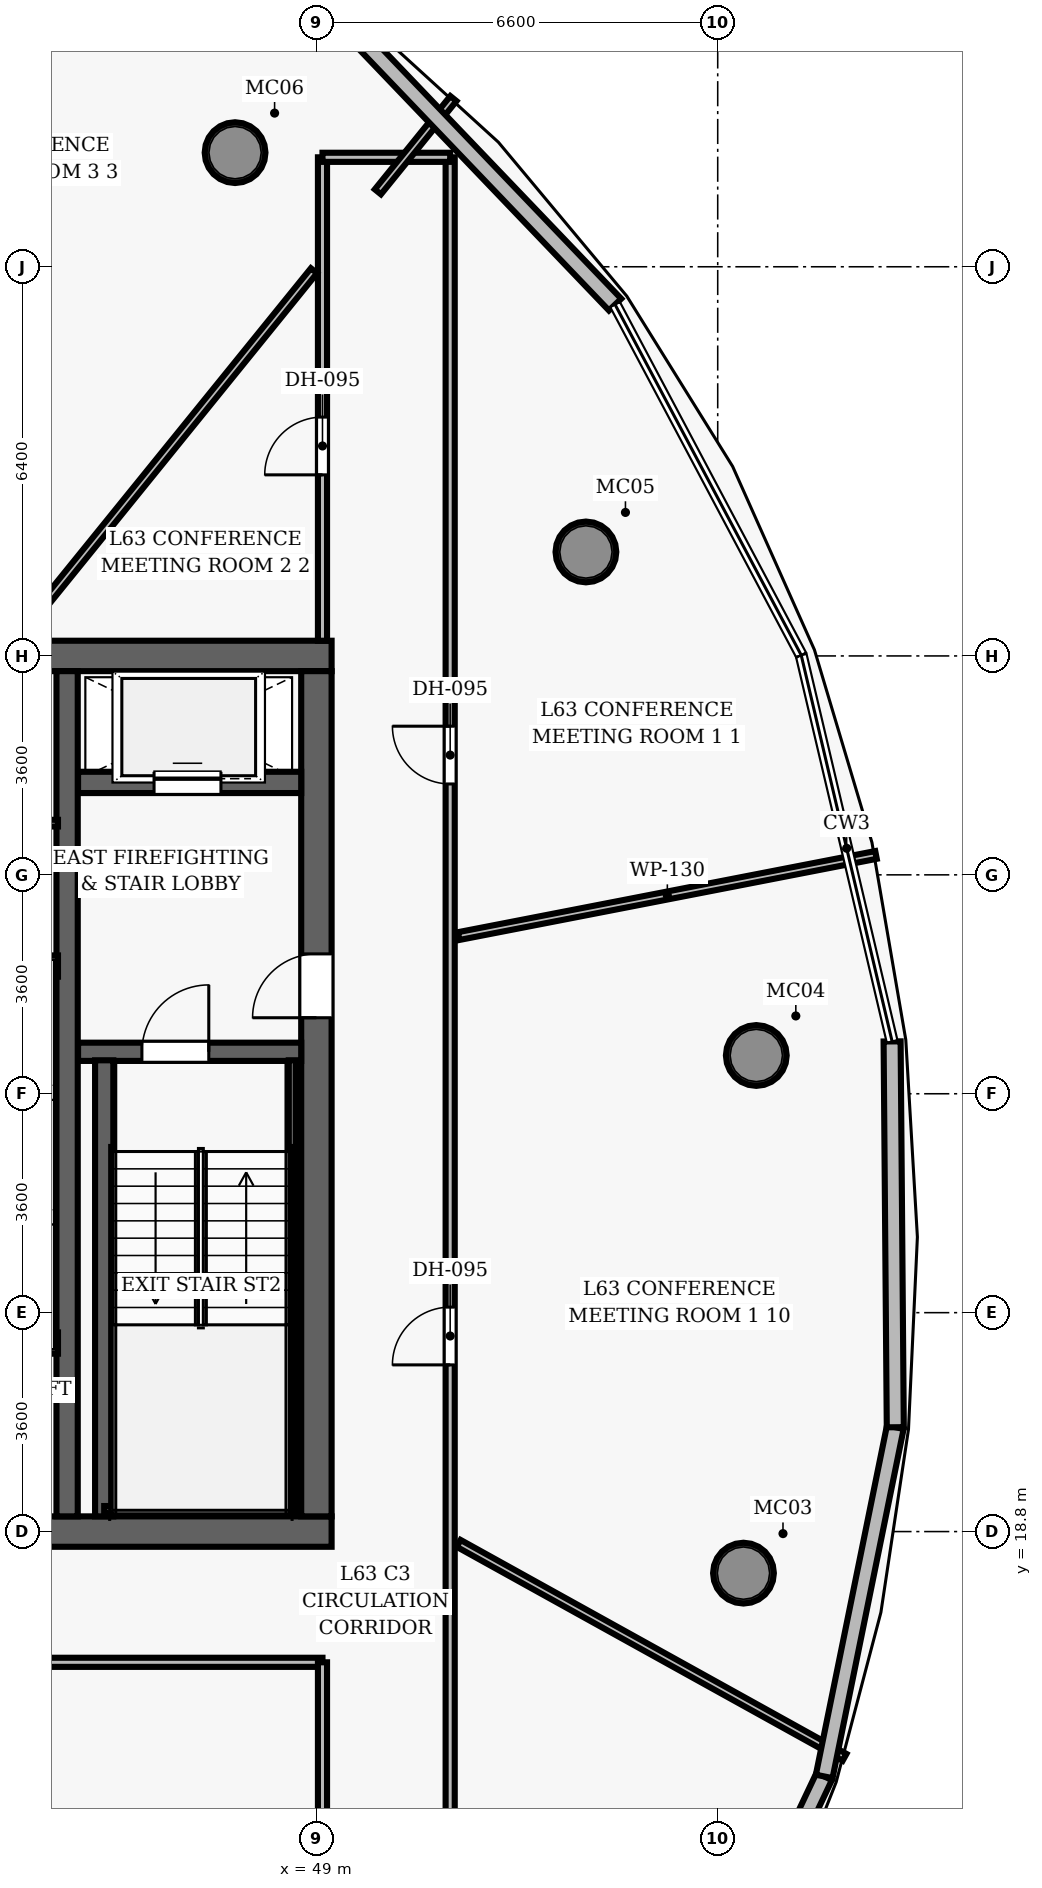
"""IFC4 building model, lengths in metres.
Left out: names, types, materials, properties, quantities, classifications, styles, units other than length and angle.
Written with IfcOpenShell. Run it as: python <this file> out.ifc"""

import sys

from ifc_helpers import new_model, si_unit, direction, frame, frame_2d, origin, origin_2d, place, context, subcontext, project, spatial, rectangle, hollow_circle, extrude, element, fill, save


model = new_model("IFC4")
c1 = context("Model", 3, precision=1e-05, world=origin(), true_north=direction((0.0, 1.0)))
c2 = subcontext(c1, "Body", "Model", "MODEL_VIEW")
j1 = project(units=[si_unit("LENGTHUNIT", "METRE"), si_unit("PLANEANGLEUNIT", "RADIAN")], contexts=[c1])
p1 = place(None, origin())
s1 = spatial("IfcSite", under=j1, at=p1, CompositionType="ELEMENT")
p2 = place(p1, origin())
s2 = spatial("IfcBuilding", under=s1, at=p2, CompositionType="ELEMENT")
p3 = place(p2, frame((0.0, 0.0, 249.75)))
s3 = spatial("IfcBuildingStorey", under=s2, at=p3, CompositionType="ELEMENT", Elevation=249.75)
p4 = place(p3, frame((26.75, 18.8, 0.0), z_axis=(0.0, 0.0, 1.0), x_axis=(1.0, 0.0, 0.0)))
e1 = element("IfcWall", 1, at=p4, inside=s3, PredefinedType="SHEAR", context=c2, shape_type="SweptSolid", body=[
    extrude(rectangle(XDim=22.5, YDim=0.5, at=frame_2d((11.25, 0.0))), origin(), (0.0, 0.0, 1.0), 3.85),
])
p5 = place(p4, frame((14.47, 0.0, 0.0)))
e2 = element("IfcOpeningElement", 2, at=p5, cuts=e1, PredefinedType="OPENING", context=c2, shape_type="SweptSolid", body=[
    extrude(rectangle(XDim=1.05, YDim=2.15, at=frame_2d((0.525, 1.075))), frame((0.0, 0.26, 0.0), z_axis=(0.0, -1.0, 0.0), x_axis=(1.0, 0.0, 0.0)), (0.0, 0.0, 1.0), 0.52),
])
p6 = place(p3, frame((26.75, 33.2, 0.0), z_axis=(0.0, 0.0, 1.0), x_axis=(1.0, 0.0, 0.0)))
e3 = element("IfcWall", 3, at=p6, inside=s3, PredefinedType="SHEAR", context=c2, shape_type="SweptSolid", body=[
    extrude(rectangle(XDim=22.5, YDim=0.5, at=frame_2d((11.25, 0.0))), origin(), (0.0, 0.0, 1.0), 3.85),
])
p7 = place(p3, frame((49.0, 19.05, 0.0), z_axis=(0.0, 0.0, 1.0), x_axis=(0.0, 1.0, 0.0)))
e4 = element("IfcWall", 4, at=p7, inside=s3, PredefinedType="SHEAR", context=c2, shape_type="SweptSolid", body=[
    extrude(rectangle(XDim=13.9, YDim=0.5, at=frame_2d((6.95, 0.0))), origin(), (0.0, 0.0, 1.0), 3.85),
])
p8 = place(p7, frame((8.2, 0.0, 0.0)))
e5 = element("IfcOpeningElement", 5, at=p8, cuts=e4, PredefinedType="OPENING", context=c2, shape_type="SweptSolid", body=[
    extrude(rectangle(XDim=1.05, YDim=2.15, at=frame_2d((0.525, 1.075))), frame((0.0, 0.26, 0.0), z_axis=(0.0, -1.0, 0.0), x_axis=(1.0, 0.0, 0.0)), (0.0, 0.0, 1.0), 0.52),
])
p9 = place(p3, frame((44.9, 19.05, 0.0), z_axis=(0.0, 0.0, 1.0), x_axis=(0.0, 1.0, 0.0)))
e6 = element("IfcWall", 6, at=p9, inside=s3, PredefinedType="SHEAR", context=c2, shape_type="SweptSolid", body=[
    extrude(rectangle(XDim=13.9, YDim=0.35, at=frame_2d((6.95, 0.0))), origin(), (0.0, 0.0, 1.0), 3.85),
])
for number, where, z_axis, x_axis in (
    (7, (56.024, 18.116, 0.0), (0.0, 0.0, 1.0), (1.0, 0.0, 0.0)),
    (8, (56.235, 26.629, 0.0), (0.0, 0.0, 1.0), (1.0, 0.0, 0.0)),
    (9, (53.433, 34.91, 0.0), (0.0, 0.0, 1.0), (1.0, 0.0, 0.0)),
    (10, (47.662, 41.477, 0.0), (0.0, 0.0, 1.0), (1.0, 0.0, 0.0)),
):
    element("IfcColumn", number, at=place(p3, frame(where, z_axis=z_axis, x_axis=x_axis)), inside=s3, PredefinedType="COLUMN", context=c2, shape_type="SweptSolid", body=[
        extrude(hollow_circle(Radius=0.5, WallThickness=0.045, at=origin_2d()), origin(), (0.0, 0.0, 1.0), 3.85),
    ])
p10 = place(p3, frame((45.08, 26.69, 0.0), z_axis=(0.0, 0.0, 1.0), x_axis=(1.0, 0.0, 0.0)))
e11 = element("IfcWall", 11, at=p10, inside=s3, PredefinedType="SHEAR", context=c2, shape_type="SweptSolid", body=[
    extrude(rectangle(XDim=3.67, YDim=0.3, at=frame_2d((1.835, 0.0))), origin(), (0.0, 0.0, 1.0), 3.85),
])
p11 = place(p10, frame((1.05, 0.0, 0.0)))
e12 = element("IfcOpeningElement", 12, at=p11, cuts=e11, PredefinedType="OPENING", context=c2, shape_type="SweptSolid", body=[
    extrude(rectangle(XDim=1.1, YDim=2.15, at=frame_2d((0.55, 1.075))), frame((0.0, 0.16, 0.0), z_axis=(0.0, -1.0, 0.0), x_axis=(1.0, 0.0, 0.0)), (0.0, 0.0, 1.0), 0.32),
])
p12 = place(p3, frame((45.51, 19.05, 0.0), z_axis=(0.0, 0.0, 1.0), x_axis=(0.0, 1.0, 0.0)))
e13 = element("IfcWall", 13, at=p12, inside=s3, PredefinedType="SHEAR", context=c2, shape_type="SweptSolid", body=[
    extrude(rectangle(XDim=7.5, YDim=0.3, at=frame_2d((3.75, 0.0))), origin(), (0.0, 0.0, 1.0), 3.85),
])
p13 = place(p3, frame((48.605, 19.1, 0.0), z_axis=(0.0, 0.0, 1.0), x_axis=(0.0, 1.0, 0.0)))
e14 = element("IfcWall", 14, at=p13, inside=s3, PredefinedType="SHEAR", context=c2, shape_type="SweptSolid", body=[
    extrude(rectangle(XDim=7.45, YDim=0.12, at=frame_2d((3.725, 0.0))), origin(), (0.0, 0.0, 1.0), 3.85),
])
p14 = place(p3, frame((45.51, 19.16, 0.0), z_axis=(0.0, 0.0, 1.0), x_axis=(1.0, 0.0, 0.0)))
e15 = element("IfcWall", 15, at=p14, inside=s3, PredefinedType="SHEAR", context=c2, shape_type="SweptSolid", body=[
    extrude(rectangle(XDim=3.095, YDim=0.12, at=frame_2d((1.547, 0.0))), origin(), (0.0, 0.0, 1.0), 3.85),
])
p15 = place(p3, frame((45.08, 31.12, 0.0), z_axis=(0.0, 0.0, 1.0), x_axis=(1.0, 0.0, 0.0)))
e16 = element("IfcWall", 16, at=p15, inside=s3, PredefinedType="SHEAR", context=c2, shape_type="SweptSolid", body=[
    extrude(rectangle(XDim=3.67, YDim=0.35, at=frame_2d((1.835, 0.0))), origin(), (0.0, 0.0, 1.0), 3.04),
])
p16 = place(p15, frame((1.25, 0.0, 0.0)))
e17 = element("IfcOpeningElement", 17, at=p16, cuts=e16, PredefinedType="OPENING", context=c2, shape_type="SweptSolid", body=[
    extrude(rectangle(XDim=1.1, YDim=2.15, at=frame_2d((0.55, 1.075))), frame((0.0, 0.185, 0.0), z_axis=(0.0, -1.0, 0.0), x_axis=(1.0, 0.0, 0.0)), (0.0, 0.0, 1.0), 0.37),
])
for number, where, z_axis, x_axis in (
    (18, (42.72, 21.9, 0.0), (0.0, 0.0, 1.0), (1.0, 0.0, 0.0)),
    (19, (42.72, 28.1, 0.0), (0.0, 0.0, 1.0), (1.0, 0.0, 0.0)),
):
    element("IfcWall", number, at=place(p3, frame(where, z_axis=z_axis, x_axis=x_axis)), inside=s3, PredefinedType="SHEAR", context=c2, shape_type="SweptSolid", body=[
        extrude(rectangle(XDim=2.03, YDim=0.35, at=frame_2d((1.015, 0.0))), origin(), (0.0, 0.0, 1.0), 3.04),
    ])
p17 = place(p3, frame((42.55, 30.45, 0.0), z_axis=(0.0, 0.0, 1.0), x_axis=(1.0, 0.0, 0.0)))
e20 = element("IfcWall", 20, at=p17, inside=s3, PredefinedType="PARTITIONING", context=c2, shape_type="SweptSolid", body=[
    extrude(rectangle(XDim=2.2, YDim=0.11, at=frame_2d((1.1, 0.0))), origin(), (0.0, 0.0, 1.0), 3.04),
])
p18 = place(p3, frame((26.9, 16.65, 0.0), z_axis=(0.0, 0.0, 1.0), x_axis=(1.0, 0.0, 0.0)))
e21 = element("IfcWall", 21, at=p18, inside=s3, PredefinedType="PARTITIONING", context=c2, shape_type="SweptSolid", body=[
    extrude(rectangle(XDim=22.2, YDim=0.15, at=frame_2d((11.1, 0.0))), origin(), (0.0, 0.0, 1.0), 3.04),
])
p19 = place(p18, frame((5.627, 0.0, 0.0)))
e22 = element("IfcOpeningElement", 22, at=p19, cuts=e21, PredefinedType="OPENING", context=c2, shape_type="SweptSolid", body=[
    extrude(rectangle(XDim=0.95, YDim=2.15, at=frame_2d((0.475, 1.075))), frame((0.0, 0.085, 0.0), z_axis=(0.0, -1.0, 0.0), x_axis=(1.0, 0.0, 0.0)), (0.0, 0.0, 1.0), 0.17),
])
p20 = place(p18, frame((12.684, 0.0, 0.0)))
e23 = element("IfcOpeningElement", 23, at=p20, cuts=e21, PredefinedType="OPENING", context=c2, shape_type="SweptSolid", body=[
    extrude(rectangle(XDim=0.95, YDim=2.15, at=frame_2d((0.475, 1.075))), frame((0.0, 0.085, 0.0), z_axis=(0.0, -1.0, 0.0), x_axis=(1.0, 0.0, 0.0)), (0.0, 0.0, 1.0), 0.17),
])
p21 = place(p18, frame((15.904, 0.0, 0.0)))
e24 = element("IfcOpeningElement", 24, at=p21, cuts=e21, PredefinedType="OPENING", context=c2, shape_type="SweptSolid", body=[
    extrude(rectangle(XDim=0.95, YDim=2.15, at=frame_2d((0.475, 1.075))), frame((0.0, 0.085, 0.0), z_axis=(0.0, -1.0, 0.0), x_axis=(1.0, 0.0, 0.0)), (0.0, 0.0, 1.0), 0.17),
])
p22 = place(p3, frame((51.2, 10.6, 0.0), z_axis=(0.0, 0.0, 1.0), x_axis=(0.0, 1.0, 0.0)))
e25 = element("IfcWall", 25, at=p22, inside=s3, PredefinedType="PARTITIONING", context=c2, shape_type="SweptSolid", body=[
    extrude(rectangle(XDim=30.8, YDim=0.15, at=frame_2d((15.4, 0.0))), origin(), (0.0, 0.0, 1.0), 3.04),
])
p23 = place(p22, frame((20.494, 0.0, 0.0)))
e26 = element("IfcOpeningElement", 26, at=p23, cuts=e25, PredefinedType="OPENING", context=c2, shape_type="SweptSolid", body=[
    extrude(rectangle(XDim=0.95, YDim=2.15, at=frame_2d((0.475, 1.075))), frame((0.0, 0.085, 0.0), z_axis=(0.0, -1.0, 0.0), x_axis=(1.0, 0.0, 0.0)), (0.0, 0.0, 1.0), 0.17),
])
p24 = place(p22, frame((10.941, 0.0, 0.0)))
e27 = element("IfcOpeningElement", 27, at=p24, cuts=e25, PredefinedType="OPENING", context=c2, shape_type="SweptSolid", body=[
    extrude(rectangle(XDim=0.95, YDim=2.15, at=frame_2d((0.475, 1.075))), frame((0.0, 0.085, 0.0), z_axis=(0.0, -1.0, 0.0), x_axis=(1.0, 0.0, 0.0)), (0.0, 0.0, 1.0), 0.17),
])
p25 = place(p3, frame((49.1, 10.6, 0.0), z_axis=(0.0, 0.0, 1.0), x_axis=(0.0, 1.0, 0.0)))
e28 = element("IfcWall", 28, at=p25, inside=s3, PredefinedType="PARTITIONING", context=c2, shape_type="SweptSolid", body=[
    extrude(rectangle(XDim=6.05, YDim=0.15, at=frame_2d((3.025, 0.0))), origin(), (0.0, 0.0, 1.0), 3.04),
])
p26 = place(p3, frame((49.1, 33.45, 0.0), z_axis=(0.0, 0.0, 1.0), x_axis=(0.0, 1.0, 0.0)))
e29 = element("IfcWall", 29, at=p26, inside=s3, PredefinedType="PARTITIONING", context=c2, shape_type="SweptSolid", body=[
    extrude(rectangle(XDim=7.95, YDim=0.15, at=frame_2d((3.975, 0.0))), origin(), (0.0, 0.0, 1.0), 3.04),
])
p27 = place(p26, frame((2.728, 0.0, 0.0)))
e30 = element("IfcOpeningElement", 30, at=p27, cuts=e29, PredefinedType="OPENING", context=c2, shape_type="SweptSolid", body=[
    extrude(rectangle(XDim=0.95, YDim=2.15, at=frame_2d((0.475, 1.075))), frame((0.0, 0.085, 0.0), z_axis=(0.0, -1.0, 0.0), x_axis=(1.0, 0.0, 0.0)), (0.0, 0.0, 1.0), 0.17),
])
p28 = place(p3, frame((49.1, 41.4, 0.0), z_axis=(0.0, 0.0, 1.0), x_axis=(1.0, 0.0, 0.0)))
e31 = element("IfcWall", 31, at=p28, inside=s3, PredefinedType="PARTITIONING", context=c2, shape_type="SweptSolid", body=[
    extrude(rectangle(XDim=2.1, YDim=0.15, at=frame_2d((1.05, 0.0))), origin(), (0.0, 0.0, 1.0), 3.04),
])
p29 = place(p3, frame((51.34, 28.593, 0.0), z_axis=(0.0, 0.0, 1.0), x_axis=(0.981623384969, 0.190828535816, 0.0)))
e32 = element("IfcWall", 32, at=p29, inside=s3, PredefinedType="PARTITIONING", context=c2, shape_type="SweptSolid", body=[
    extrude(rectangle(XDim=6.992, YDim=0.13, at=frame_2d((3.496, 0.0))), origin(), (0.0, 0.0, 1.0), 3.04),
])
p30 = place(p3, frame((44.049, 33.47, 0.0), z_axis=(0.0, 0.0, 1.0), x_axis=(0.629319722443, 0.777146502883, 0.0)))
e33 = element("IfcWall", 33, at=p30, inside=s3, PredefinedType="PARTITIONING", context=c2, shape_type="SweptSolid", body=[
    extrude(rectangle(XDim=7.803, YDim=0.13, at=frame_2d((3.902, 0.0))), origin(), (0.0, 0.0, 1.0), 3.04),
])
p31 = place(p3, frame((50.011, 40.832, 0.0), z_axis=(0.0, 0.0, 1.0), x_axis=(0.629255162261, 0.777198778157, 0.0)))
e34 = element("IfcWall", 34, at=p31, inside=s3, PredefinedType="PARTITIONING", context=c2, shape_type="SweptSolid", body=[
    extrude(rectangle(XDim=1.974, YDim=0.13, at=frame_2d((0.987, 0.0))), origin(), (0.0, 0.0, 1.0), 3.04),
])
p32 = place(p3, frame((41.643, 16.51, 0.0), z_axis=(0.0, 0.0, 1.0), x_axis=(0.358373851229, -0.933578161032, 0.0)))
e35 = element("IfcWall", 35, at=p32, inside=s3, PredefinedType="PARTITIONING", context=c2, shape_type="SweptSolid", body=[
    extrude(rectangle(XDim=13.166, YDim=0.13, at=frame_2d((6.583, 0.0))), origin(), (0.0, 0.0, 1.0), 3.04),
])
p33 = place(p3, frame((51.34, 18.605, 0.0), z_axis=(0.0, 0.0, 1.0), x_axis=(0.87461556229, -0.484817097678, 0.0)))
e36 = element("IfcWall", 36, at=p33, inside=s3, PredefinedType="PARTITIONING", context=c2, shape_type="SweptSolid", body=[
    extrude(rectangle(XDim=7.256, YDim=0.13, at=frame_2d((3.628, 0.0))), origin(), (0.0, 0.0, 1.0), 3.04),
])
p34 = place(p3, frame((57.352, 14.773, 0.0), z_axis=(0.0, 0.0, 1.0), x_axis=(-0.428068107667, -0.903746477281, 0.0)))
e37 = element("IfcWall", 37, at=p34, inside=s3, PredefinedType="SOLIDWALL", context=c2, shape_type="SweptSolid", body=[
    extrude(rectangle(XDim=5.179, YDim=0.28, at=frame_2d((2.59, 0.0))), origin(), (0.0, 0.0, 1.0), 3.625),
])
p35 = place(p3, frame((58.521, 20.516, 0.0), z_axis=(0.0, 0.0, 1.0), x_axis=(-0.199480028062, -0.979901892234, 0.0)))
e38 = element("IfcWall", 38, at=p35, inside=s3, PredefinedType="SOLIDWALL", context=c2, shape_type="SweptSolid", body=[
    extrude(rectangle(XDim=5.86, YDim=0.28, at=frame_2d((2.93, 0.0))), origin(), (0.0, 0.0, 1.0), 3.625),
])
p36 = place(p3, frame((58.468, 26.861, 0.0), z_axis=(0.0, 0.0, 1.0), x_axis=(0.008233973814, -0.999966100263, 0.0)))
e39 = element("IfcWall", 39, at=p36, inside=s3, PredefinedType="SOLIDWALL", context=c2, shape_type="SweptSolid", body=[
    extrude(rectangle(XDim=6.345, YDim=0.28, at=frame_2d((3.173, 0.0))), origin(), (0.0, 0.0, 1.0), 3.625),
])
p37 = place(p3, frame((49.4, 43.694, 0.0), z_axis=(0.0, 0.0, 1.0), x_axis=(0.691260013962, -0.722606111998, 0.0)))
e40 = element("IfcWall", 40, at=p37, inside=s3, PredefinedType="SOLIDWALL", context=c2, shape_type="SweptSolid", body=[
    extrude(rectangle(XDim=6.527, YDim=0.28, at=frame_2d((3.263, 0.0))), origin(), (0.0, 0.0, 1.0), 3.625),
])
p38 = place(p11, origin())
e41 = element("IfcDoor", 41, at=p38, inside=s3, OperationType="SINGLE_SWING_RIGHT", PredefinedType="DOOR", context=c2, shape_type="SweptSolid", body=[
    extrude(rectangle(XDim=1.1, YDim=2.15, at=frame_2d((0.55, 1.075))), frame((0.0, 0.025, 0.0), z_axis=(0.0, -1.0, 0.0), x_axis=(1.0, 0.0, 0.0)), (0.0, 0.0, 1.0), 0.05),
])
fill(e12, e41)
p39 = place(p8, origin())
e42 = element("IfcDoor", 42, at=p39, inside=s3, OperationType="SINGLE_SWING_LEFT", PredefinedType="DOOR", context=c2, shape_type="SweptSolid", body=[
    extrude(rectangle(XDim=1.05, YDim=2.15, at=frame_2d((0.525, 1.075))), frame((0.0, 0.025, 0.0), z_axis=(0.0, -1.0, 0.0), x_axis=(1.0, 0.0, 0.0)), (0.0, 0.0, 1.0), 0.05),
])
fill(e5, e42)
p40 = place(p23, origin())
e43 = element("IfcDoor", 43, at=p40, inside=s3, OperationType="SINGLE_SWING_RIGHT", PredefinedType="DOOR", context=c2, shape_type="SweptSolid", body=[
    extrude(rectangle(XDim=0.95, YDim=2.15, at=frame_2d((0.475, 1.075))), frame((0.0, 0.025, 0.0), z_axis=(0.0, -1.0, 0.0), x_axis=(1.0, 0.0, 0.0)), (0.0, 0.0, 1.0), 0.05),
])
fill(e26, e43)
p41 = place(p27, origin())
e44 = element("IfcDoor", 44, at=p41, inside=s3, OperationType="SINGLE_SWING_LEFT", PredefinedType="DOOR", context=c2, shape_type="SweptSolid", body=[
    extrude(rectangle(XDim=0.95, YDim=2.15, at=frame_2d((0.475, 1.075))), frame((0.0, 0.025, 0.0), z_axis=(0.0, -1.0, 0.0), x_axis=(1.0, 0.0, 0.0)), (0.0, 0.0, 1.0), 0.05),
])
fill(e30, e44)
p42 = place(p24, origin())
e45 = element("IfcDoor", 45, at=p42, inside=s3, OperationType="SINGLE_SWING_LEFT", PredefinedType="DOOR", context=c2, shape_type="SweptSolid", body=[
    extrude(rectangle(XDim=0.95, YDim=2.15, at=frame_2d((0.475, 1.075))), frame((0.0, 0.025, 0.0), z_axis=(0.0, -1.0, 0.0), x_axis=(1.0, 0.0, 0.0)), (0.0, 0.0, 1.0), 0.05),
])
fill(e27, e45)
p43 = place(p16, origin())
e46 = element("IfcDoor", 46, at=p43, inside=s3, OperationType="SLIDING_TO_LEFT", PredefinedType="DOOR", context=c2, shape_type="SweptSolid", body=[
    extrude(rectangle(XDim=1.1, YDim=2.15, at=frame_2d((0.55, 1.075))), frame((0.0, 0.025, 0.0), z_axis=(0.0, -1.0, 0.0), x_axis=(1.0, 0.0, 0.0)), (0.0, 0.0, 1.0), 0.05),
])
fill(e17, e46)
save(model, sys.argv[1])
